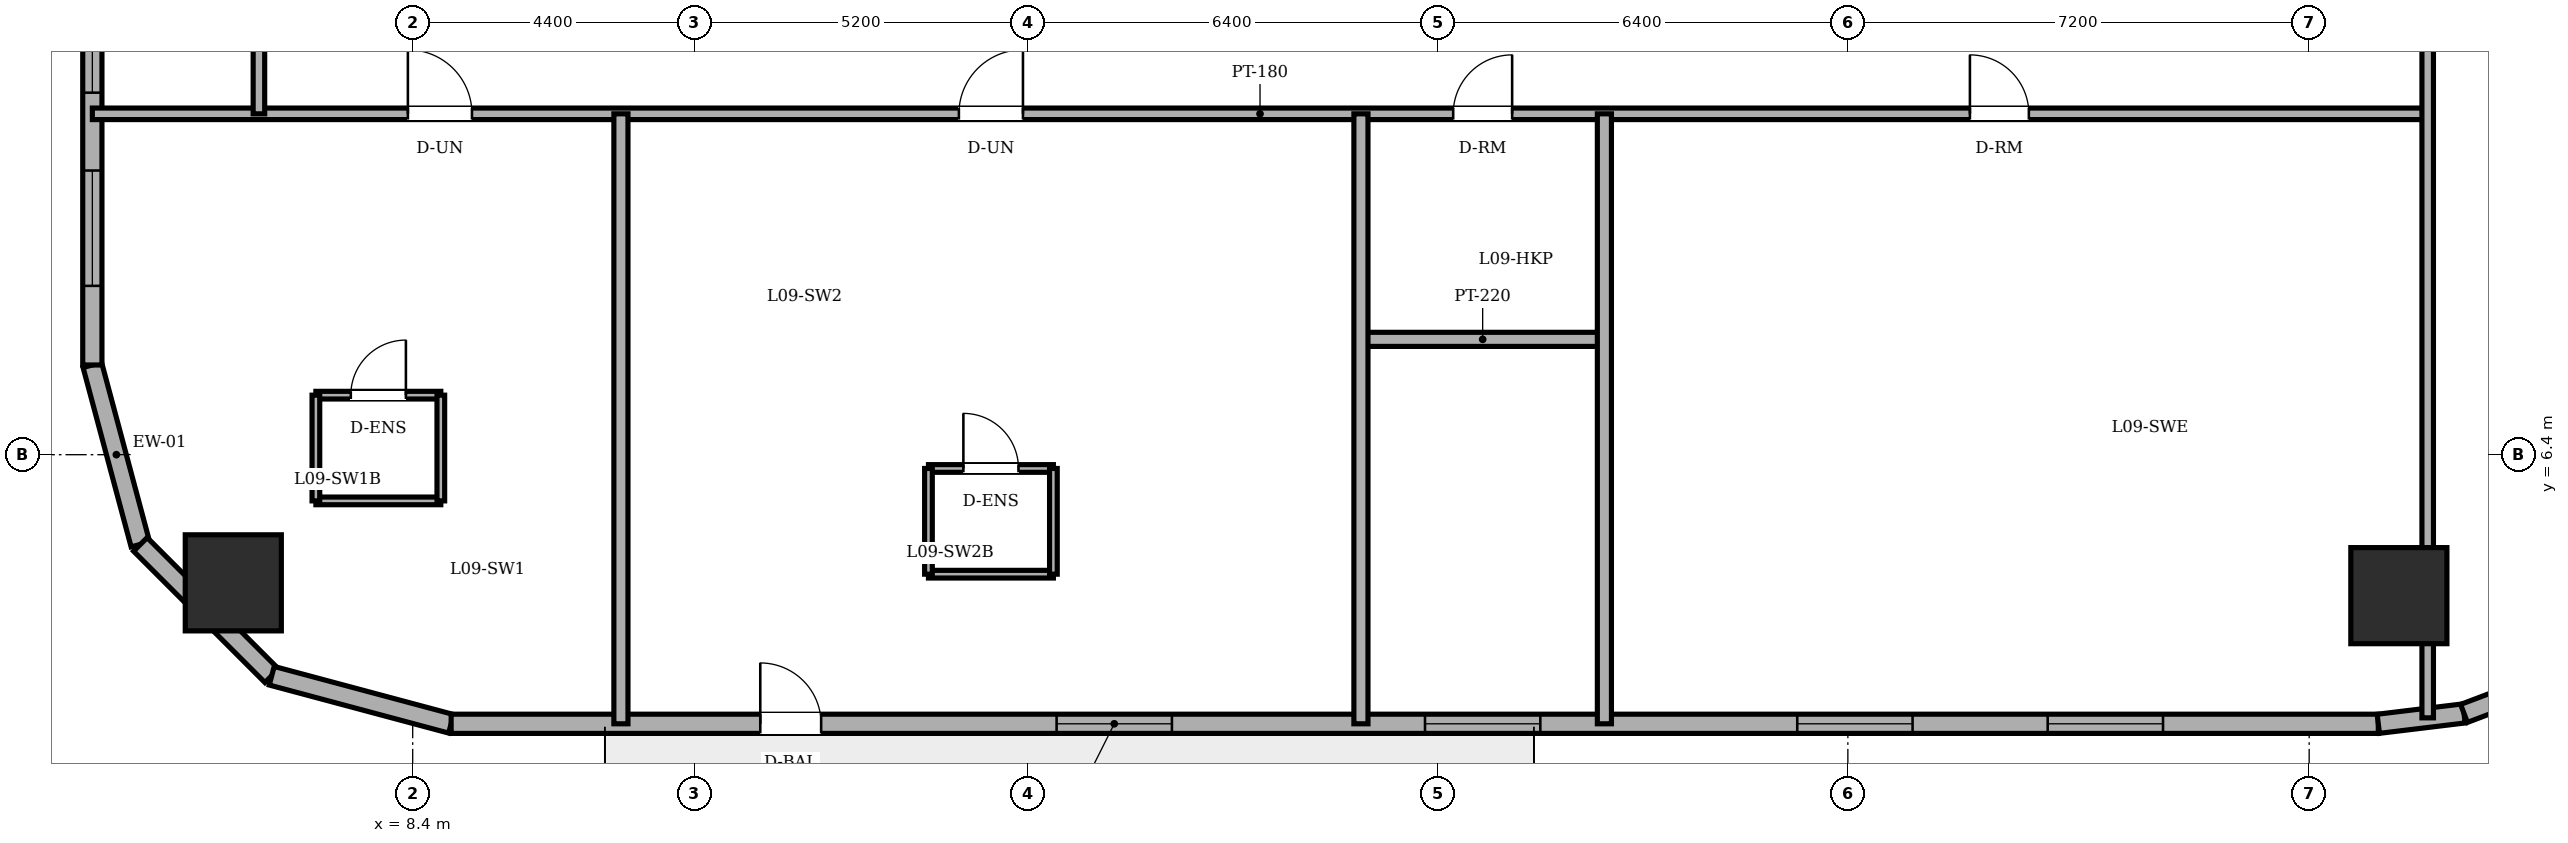
"""IFC4 building model, lengths in metres.
Left out: names, types, materials, properties, quantities, classifications, styles, units other than length and angle.
Written with IfcOpenShell. Run it as: python <this file> out.ifc"""

import sys

from ifc_helpers import new_model, si_unit, direction, frame, frame_2d, origin, origin_2d, place, context, subcontext, project, spatial, rectangle, circle, extrude, element, fill, save


model = new_model("IFC4")
c1 = context("Model", 3, precision=1e-05, world=origin(), true_north=direction((0.0, 1.0)))
c2 = subcontext(c1, "Body", "Model", "MODEL_VIEW")
j1 = project(units=[si_unit("LENGTHUNIT", "METRE"), si_unit("PLANEANGLEUNIT", "RADIAN")], contexts=[c1])
p1 = place(None, origin())
s1 = spatial("IfcSite", under=j1, at=p1, CompositionType="ELEMENT")
p2 = place(p1, origin())
s2 = spatial("IfcBuilding", under=s1, at=p2, CompositionType="ELEMENT")
p3 = place(p2, frame((0.0, 0.0, 36.0)))
s3 = spatial("IfcBuildingStorey", under=s2, at=p3, CompositionType="ELEMENT", Elevation=36.0)
for number, where, z_axis, x_axis in (
    (1, (5.6, 4.4, 0.0), (0.0, 0.0, 1.0), (1.0, 0.0, 0.0)),
    (2, (39.4, 4.2, 0.0), (0.0, 0.0, 1.0), (1.0, 0.0, 0.0)),
):
    element("IfcColumn", number, at=place(p3, frame(where, z_axis=z_axis, x_axis=x_axis)), inside=s3, PredefinedType="COLUMN", context=c2, shape_type="SweptSolid", body=[
        extrude(circle(Radius=0.75, at=origin_2d()), origin(), (0.0, 0.0, 1.0), 3.6),
    ])
p4 = place(p3, frame((3.4, 7.8, 0.0), z_axis=(0.0, 0.0, 1.0), x_axis=(0.258731875344, -0.96594917914, 0.0)))
e3 = element("IfcWall", 3, at=p4, inside=s3, PredefinedType="SOLIDWALL", context=c2, shape_type="SweptSolid", body=[
    extrude(rectangle(XDim=2.899, YDim=0.3, at=frame_2d((1.449, 0.0))), origin(), (0.0, 0.0, 1.0), 3.4),
])
p5 = place(p3, frame((4.15, 5.0, 0.0), z_axis=(0.0, 0.0, 1.0), x_axis=(0.707106781187, -0.707106781187, 0.0)))
e4 = element("IfcWall", 4, at=p5, inside=s3, PredefinedType="SOLIDWALL", context=c2, shape_type="SweptSolid", body=[
    extrude(rectangle(XDim=2.899, YDim=0.3, at=frame_2d((1.45, 0.0))), origin(), (0.0, 0.0, 1.0), 3.4),
])
p6 = place(p3, frame((6.2, 2.95, 0.0), z_axis=(0.0, 0.0, 1.0), x_axis=(0.96594917914, -0.258731875344, 0.0)))
e5 = element("IfcWall", 5, at=p6, inside=s3, PredefinedType="SOLIDWALL", context=c2, shape_type="SweptSolid", body=[
    extrude(rectangle(XDim=2.899, YDim=0.3, at=frame_2d((1.449, 0.0))), origin(), (0.0, 0.0, 1.0), 3.4),
])
p7 = place(p3, frame((9.0, 2.2, 0.0), z_axis=(0.0, 0.0, 1.0), x_axis=(1.0, 0.0, 0.0)))
e6 = element("IfcWall", 6, at=p7, inside=s3, PredefinedType="SOLIDWALL", context=c2, shape_type="SweptSolid", body=[
    extrude(rectangle(XDim=30.079, YDim=0.3, at=frame_2d((15.04, 0.0))), origin(), (0.0, 0.0, 1.0), 3.4),
])
p8 = place(p7, frame((4.825, 0.0, 0.0)))
e7 = element("IfcOpeningElement", 7, at=p8, cuts=e6, PredefinedType="OPENING", context=c2, shape_type="SweptSolid", body=[
    extrude(rectangle(XDim=0.95, YDim=2.2, at=frame_2d((0.475, 1.1))), frame((0.0, 0.16, 0.0), z_axis=(0.0, -1.0, 0.0), x_axis=(1.0, 0.0, 0.0)), (0.0, 0.0, 1.0), 0.32),
])
p9 = place(p7, frame((9.45, 0.0, 0.85)))
e8 = element("IfcOpeningElement", 8, at=p9, cuts=e6, PredefinedType="OPENING", context=c2, shape_type="SweptSolid", body=[
    extrude(rectangle(XDim=1.8, YDim=1.55, at=frame_2d((0.9, 0.775))), frame((0.0, 0.16, 0.0), z_axis=(0.0, -1.0, 0.0), x_axis=(1.0, 0.0, 0.0)), (0.0, 0.0, 1.0), 0.32),
])
p10 = place(p7, frame((15.2, 0.0, 0.85)))
e9 = element("IfcOpeningElement", 9, at=p10, cuts=e6, PredefinedType="OPENING", context=c2, shape_type="SweptSolid", body=[
    extrude(rectangle(XDim=1.8, YDim=1.55, at=frame_2d((0.9, 0.775))), frame((0.0, 0.16, 0.0), z_axis=(0.0, -1.0, 0.0), x_axis=(1.0, 0.0, 0.0)), (0.0, 0.0, 1.0), 0.32),
])
p11 = place(p7, frame((21.01, 0.0, 0.85)))
e10 = element("IfcOpeningElement", 10, at=p11, cuts=e6, PredefinedType="OPENING", context=c2, shape_type="SweptSolid", body=[
    extrude(rectangle(XDim=1.8, YDim=1.55, at=frame_2d((0.9, 0.775))), frame((0.0, 0.16, 0.0), z_axis=(0.0, -1.0, 0.0), x_axis=(1.0, 0.0, 0.0)), (0.0, 0.0, 1.0), 0.32),
])
p12 = place(p7, frame((24.919, 0.0, 0.85)))
e11 = element("IfcOpeningElement", 11, at=p12, cuts=e6, PredefinedType="OPENING", context=c2, shape_type="SweptSolid", body=[
    extrude(rectangle(XDim=1.8, YDim=1.55, at=frame_2d((0.9, 0.775))), frame((0.0, 0.16, 0.0), z_axis=(0.0, -1.0, 0.0), x_axis=(1.0, 0.0, 0.0)), (0.0, 0.0, 1.0), 0.32),
])
p13 = place(p3, frame((39.079, 2.2, 0.0), z_axis=(0.0, 0.0, 1.0), x_axis=(0.992739027259, 0.120288086515, 0.0)))
e12 = element("IfcWall", 12, at=p13, inside=s3, PredefinedType="SOLIDWALL", context=c2, shape_type="SweptSolid", body=[
    extrude(rectangle(XDim=1.348, YDim=0.3, at=frame_2d((0.674, 0.0))), origin(), (0.0, 0.0, 1.0), 3.4),
])
p14 = place(p3, frame((40.417, 2.362, 0.0), z_axis=(0.0, 0.0, 1.0), x_axis=(0.935156721165, 0.354234254216, 0.0)))
e13 = element("IfcWall", 13, at=p14, inside=s3, PredefinedType="SOLIDWALL", context=c2, shape_type="SweptSolid", body=[
    extrude(rectangle(XDim=1.349, YDim=0.3, at=frame_2d((0.675, 0.0))), origin(), (0.0, 0.0, 1.0), 3.4),
])
p15 = place(p3, frame((3.4, 40.2, 0.0), z_axis=(0.0, 0.0, 1.0), x_axis=(0.0, -1.0, 0.0)))
e14 = element("IfcWall", 14, at=p15, inside=s3, PredefinedType="SOLIDWALL", context=c2, shape_type="SweptSolid", body=[
    extrude(rectangle(XDim=32.4, YDim=0.3, at=frame_2d((16.2, 0.0))), origin(), (0.0, 0.0, 1.0), 3.4),
])
p16 = place(p15, frame((1.235, 0.0, 0.85)))
e15 = element("IfcOpeningElement", 15, at=p16, cuts=e14, PredefinedType="OPENING", context=c2, shape_type="SweptSolid", body=[
    extrude(rectangle(XDim=1.8, YDim=1.55, at=frame_2d((0.9, 0.775))), frame((0.0, 0.16, 0.0), z_axis=(0.0, -1.0, 0.0), x_axis=(1.0, 0.0, 0.0)), (0.0, 0.0, 1.0), 0.32),
])
p17 = place(p15, frame((4.25, 0.0, 0.85)))
e16 = element("IfcOpeningElement", 16, at=p17, cuts=e14, PredefinedType="OPENING", context=c2, shape_type="SweptSolid", body=[
    extrude(rectangle(XDim=1.8, YDim=1.55, at=frame_2d((0.9, 0.775))), frame((0.0, 0.16, 0.0), z_axis=(0.0, -1.0, 0.0), x_axis=(1.0, 0.0, 0.0)), (0.0, 0.0, 1.0), 0.32),
])
p18 = place(p15, frame((9.253, 0.0, 0.85)))
e17 = element("IfcOpeningElement", 17, at=p18, cuts=e14, PredefinedType="OPENING", context=c2, shape_type="SweptSolid", body=[
    extrude(rectangle(XDim=1.8, YDim=1.55, at=frame_2d((0.9, 0.775))), frame((0.0, 0.16, 0.0), z_axis=(0.0, -1.0, 0.0), x_axis=(1.0, 0.0, 0.0)), (0.0, 0.0, 1.0), 0.32),
])
p19 = place(p15, frame((13.027, 0.0, 0.85)))
e18 = element("IfcOpeningElement", 18, at=p19, cuts=e14, PredefinedType="OPENING", context=c2, shape_type="SweptSolid", body=[
    extrude(rectangle(XDim=1.8, YDim=1.55, at=frame_2d((0.9, 0.775))), frame((0.0, 0.16, 0.0), z_axis=(0.0, -1.0, 0.0), x_axis=(1.0, 0.0, 0.0)), (0.0, 0.0, 1.0), 0.32),
])
p20 = place(p15, frame((19.573, 0.0, 0.85)))
e19 = element("IfcOpeningElement", 19, at=p20, cuts=e14, PredefinedType="OPENING", context=c2, shape_type="SweptSolid", body=[
    extrude(rectangle(XDim=1.8, YDim=1.55, at=frame_2d((0.9, 0.775))), frame((0.0, 0.16, 0.0), z_axis=(0.0, -1.0, 0.0), x_axis=(1.0, 0.0, 0.0)), (0.0, 0.0, 1.0), 0.32),
])
p21 = place(p15, frame((22.347, 0.0, 0.85)))
e20 = element("IfcOpeningElement", 20, at=p21, cuts=e14, PredefinedType="OPENING", context=c2, shape_type="SweptSolid", body=[
    extrude(rectangle(XDim=1.8, YDim=1.55, at=frame_2d((0.9, 0.775))), frame((0.0, 0.16, 0.0), z_axis=(0.0, -1.0, 0.0), x_axis=(1.0, 0.0, 0.0)), (0.0, 0.0, 1.0), 0.32),
])
p22 = place(p15, frame((26.35, 0.0, 0.85)))
e21 = element("IfcOpeningElement", 21, at=p22, cuts=e14, PredefinedType="OPENING", context=c2, shape_type="SweptSolid", body=[
    extrude(rectangle(XDim=1.8, YDim=1.55, at=frame_2d((0.9, 0.775))), frame((0.0, 0.16, 0.0), z_axis=(0.0, -1.0, 0.0), x_axis=(1.0, 0.0, 0.0)), (0.0, 0.0, 1.0), 0.32),
])
p23 = place(p15, frame((29.365, 0.0, 0.85)))
e22 = element("IfcOpeningElement", 22, at=p23, cuts=e14, PredefinedType="OPENING", context=c2, shape_type="SweptSolid", body=[
    extrude(rectangle(XDim=1.8, YDim=1.55, at=frame_2d((0.9, 0.775))), frame((0.0, 0.16, 0.0), z_axis=(0.0, -1.0, 0.0), x_axis=(1.0, 0.0, 0.0)), (0.0, 0.0, 1.0), 0.32),
])
p24 = place(p3, frame((6.889, 7.329, 0.0), z_axis=(0.0, 0.0, 1.0), x_axis=(1.0, 0.0, 0.0)))
e23 = element("IfcWall", 23, at=p24, inside=s3, PredefinedType="PARTITIONING", context=c2, shape_type="SweptSolid", body=[
    extrude(rectangle(XDim=1.95, YDim=0.12, at=frame_2d((0.975, 0.0))), origin(), (0.0, 0.0, 1.0), 3.4),
])
p25 = place(p24, frame((0.545, 0.0, 0.0)))
e24 = element("IfcOpeningElement", 24, at=p25, cuts=e23, PredefinedType="OPENING", context=c2, shape_type="SweptSolid", body=[
    extrude(rectangle(XDim=0.86, YDim=2.1, at=frame_2d((0.43, 1.05))), frame((0.0, 0.07, 0.0), z_axis=(0.0, -1.0, 0.0), x_axis=(1.0, 0.0, 0.0)), (0.0, 0.0, 1.0), 0.14),
])
p26 = place(p3, frame((8.839, 5.679, 0.0), z_axis=(0.0, 0.0, 1.0), x_axis=(-1.0, 0.0, 0.0)))
e25 = element("IfcWall", 25, at=p26, inside=s3, PredefinedType="PARTITIONING", context=c2, shape_type="SweptSolid", body=[
    extrude(rectangle(XDim=1.95, YDim=0.12, at=frame_2d((0.975, 0.0))), origin(), (0.0, 0.0, 1.0), 3.4),
])
for number, where, z_axis, x_axis in (
    (26, (6.889, 7.329, 0.0), (0.0, 0.0, 1.0), (0.0, -1.0, 0.0)),
    (27, (8.839, 5.679, 0.0), (0.0, 0.0, 1.0), (0.0, 1.0, 0.0)),
):
    element("IfcWall", number, at=place(p3, frame(where, z_axis=z_axis, x_axis=x_axis)), inside=s3, PredefinedType="PARTITIONING", context=c2, shape_type="SweptSolid", body=[
        extrude(rectangle(XDim=1.65, YDim=0.12, at=frame_2d((0.825, 0.0))), origin(), (0.0, 0.0, 1.0), 3.4),
    ])
p27 = place(p3, frame((16.45, 6.185, 0.0), z_axis=(0.0, 0.0, 1.0), x_axis=(1.0, 0.0, 0.0)))
e28 = element("IfcWall", 28, at=p27, inside=s3, PredefinedType="PARTITIONING", context=c2, shape_type="SweptSolid", body=[
    extrude(rectangle(XDim=1.95, YDim=0.12, at=frame_2d((0.975, 0.0))), origin(), (0.0, 0.0, 1.0), 3.4),
])
p28 = place(p27, frame((0.545, 0.0, 0.0)))
e29 = element("IfcOpeningElement", 29, at=p28, cuts=e28, PredefinedType="OPENING", context=c2, shape_type="SweptSolid", body=[
    extrude(rectangle(XDim=0.86, YDim=2.1, at=frame_2d((0.43, 1.05))), frame((0.0, 0.07, 0.0), z_axis=(0.0, -1.0, 0.0), x_axis=(1.0, 0.0, 0.0)), (0.0, 0.0, 1.0), 0.14),
])
p29 = place(p3, frame((18.4, 4.535, 0.0), z_axis=(0.0, 0.0, 1.0), x_axis=(-1.0, 0.0, 0.0)))
e30 = element("IfcWall", 30, at=p29, inside=s3, PredefinedType="PARTITIONING", context=c2, shape_type="SweptSolid", body=[
    extrude(rectangle(XDim=1.95, YDim=0.12, at=frame_2d((0.975, 0.0))), origin(), (0.0, 0.0, 1.0), 2.882),
])
for number, where, z_axis, x_axis in (
    (31, (16.45, 6.185, 0.0), (0.0, 0.0, 1.0), (0.0, -1.0, 0.0)),
    (32, (18.4, 4.535, 0.0), (0.0, 0.0, 1.0), (0.0, 1.0, 0.0)),
):
    element("IfcWall", number, at=place(p3, frame(where, z_axis=z_axis, x_axis=x_axis)), inside=s3, PredefinedType="PARTITIONING", context=c2, shape_type="SweptSolid", body=[
        extrude(rectangle(XDim=1.65, YDim=0.12, at=frame_2d((0.825, 0.0))), origin(), (0.0, 0.0, 1.0), 3.4),
    ])
p30 = place(p3, frame((23.2, 8.2, 0.0), z_axis=(0.0, 0.0, 1.0), x_axis=(1.0, 0.0, 0.0)))
e33 = element("IfcWall", 33, at=p30, inside=s3, PredefinedType="PARTITIONING", context=c2, shape_type="SweptSolid", body=[
    extrude(rectangle(XDim=3.8, YDim=0.22, at=frame_2d((1.9, 0.0))), origin(), (0.0, 0.0, 1.0), 3.4),
])
p31 = place(p3, frame((3.4, 11.72, 0.0), z_axis=(0.0, 0.0, 1.0), x_axis=(1.0, 0.0, 0.0)))
e34 = element("IfcWall", 34, at=p31, inside=s3, PredefinedType="PARTITIONING", context=c2, shape_type="SweptSolid", body=[
    extrude(rectangle(XDim=36.45, YDim=0.18, at=frame_2d((18.225, 0.0))), origin(), (0.0, 0.0, 1.0), 3.4),
])
p32 = place(p31, frame((21.24, 0.0, 0.0)))
e35 = element("IfcOpeningElement", 35, at=p32, cuts=e34, PredefinedType="OPENING", context=c2, shape_type="SweptSolid", body=[
    extrude(rectangle(XDim=0.92, YDim=2.1, at=frame_2d((0.46, 1.05))), frame((0.0, 0.1, 0.0), z_axis=(0.0, -1.0, 0.0), x_axis=(1.0, 0.0, 0.0)), (0.0, 0.0, 1.0), 0.2),
])
p33 = place(p31, frame((4.925, 0.0, 0.0)))
e36 = element("IfcOpeningElement", 36, at=p33, cuts=e34, PredefinedType="OPENING", context=c2, shape_type="SweptSolid", body=[
    extrude(rectangle(XDim=1.0, YDim=2.15, at=frame_2d((0.5, 1.075))), frame((0.0, 0.1, 0.0), z_axis=(0.0, -1.0, 0.0), x_axis=(1.0, 0.0, 0.0)), (0.0, 0.0, 1.0), 0.2),
])
p34 = place(p31, frame((13.525, 0.0, 0.0)))
e37 = element("IfcOpeningElement", 37, at=p34, cuts=e34, PredefinedType="OPENING", context=c2, shape_type="SweptSolid", body=[
    extrude(rectangle(XDim=1.0, YDim=2.15, at=frame_2d((0.5, 1.075))), frame((0.0, 0.1, 0.0), z_axis=(0.0, -1.0, 0.0), x_axis=(1.0, 0.0, 0.0)), (0.0, 0.0, 1.0), 0.2),
])
p35 = place(p31, frame((29.305, 0.0, 0.0)))
e38 = element("IfcOpeningElement", 38, at=p35, cuts=e34, PredefinedType="OPENING", context=c2, shape_type="SweptSolid", body=[
    extrude(rectangle(XDim=0.92, YDim=2.1, at=frame_2d((0.46, 1.05))), frame((0.0, 0.1, 0.0), z_axis=(0.0, -1.0, 0.0), x_axis=(1.0, 0.0, 0.0)), (0.0, 0.0, 1.0), 0.2),
])
p36 = place(p3, frame((6.0, 11.72, 0.0), z_axis=(0.0, 0.0, 1.0), x_axis=(0.0, 1.0, 0.0)))
e39 = element("IfcWall", 39, at=p36, inside=s3, PredefinedType="PARTITIONING", context=c2, shape_type="SweptSolid", body=[
    extrude(rectangle(XDim=2.46, YDim=0.18, at=frame_2d((1.23, 0.0))), origin(), (0.0, 0.0, 1.0), 3.4),
])
for number, where, z_axis, x_axis in (
    (40, (11.65, 2.2, 0.0), (0.0, 0.0, 1.0), (0.0, 1.0, 0.0)),
    (41, (23.2, 2.2, 0.0), (0.0, 0.0, 1.0), (0.0, 1.0, 0.0)),
    (42, (27.0, 2.2, 0.0), (0.0, 0.0, 1.0), (0.0, 1.0, 0.0)),
):
    element("IfcWall", number, at=place(p3, frame(where, z_axis=z_axis, x_axis=x_axis)), inside=s3, PredefinedType="PARTITIONING", context=c2, shape_type="SweptSolid", body=[
        extrude(rectangle(XDim=9.52, YDim=0.22, at=frame_2d((4.76, 0.0))), origin(), (0.0, 0.0, 1.0), 3.4),
    ])
p37 = place(p3, frame((39.85, 2.293, 0.0), z_axis=(0.0, 0.0, 1.0), x_axis=(0.0, 1.0, 0.0)))
e43 = element("IfcWall", 43, at=p37, inside=s3, PredefinedType="PARTITIONING", context=c2, shape_type="SweptSolid", body=[
    extrude(rectangle(XDim=20.527, YDim=0.18, at=frame_2d((10.264, 0.0))), origin(), (0.0, 0.0, 1.0), 2.782),
])
p38 = place(p37, frame((14.257, 0.0, 0.0)))
e44 = element("IfcOpeningElement", 44, at=p38, cuts=e43, PredefinedType="OPENING", context=c2, shape_type="SweptSolid", body=[
    extrude(rectangle(XDim=0.92, YDim=2.1, at=frame_2d((0.46, 1.05))), frame((0.0, 0.1, 0.0), z_axis=(0.0, -1.0, 0.0), x_axis=(1.0, 0.0, 0.0)), (0.0, 0.0, 1.0), 0.2),
])
p39 = place(p8, origin())
e45 = element("IfcDoor", 45, at=p39, inside=s3, OperationType="SINGLE_SWING_LEFT", PredefinedType="DOOR", context=c2, shape_type="SweptSolid", body=[
    extrude(rectangle(XDim=0.95, YDim=2.2, at=frame_2d((0.475, 1.1))), frame((0.0, 0.025, 0.0), z_axis=(0.0, -1.0, 0.0), x_axis=(1.0, 0.0, 0.0)), (0.0, 0.0, 1.0), 0.05),
])
fill(e7, e45)
p40 = place(p9, origin())
e46 = element("IfcWindow", 46, at=p40, inside=s3, PartitioningType="DOUBLE_PANEL_VERTICAL", PredefinedType="WINDOW", context=c2, shape_type="SweptSolid", body=[
    extrude(rectangle(XDim=1.8, YDim=1.55, at=frame_2d((0.9, 0.775))), frame((0.0, 0.03, 0.0), z_axis=(0.0, -1.0, 0.0), x_axis=(1.0, 0.0, 0.0)), (0.0, 0.0, 1.0), 0.06),
])
fill(e8, e46)
p41 = place(p10, origin())
e47 = element("IfcWindow", 47, at=p41, inside=s3, PartitioningType="DOUBLE_PANEL_VERTICAL", PredefinedType="WINDOW", context=c2, shape_type="SweptSolid", body=[
    extrude(rectangle(XDim=1.8, YDim=1.55, at=frame_2d((0.9, 0.775))), frame((0.0, 0.03, 0.0), z_axis=(0.0, -1.0, 0.0), x_axis=(1.0, 0.0, 0.0)), (0.0, 0.0, 1.0), 0.06),
])
fill(e9, e47)
p42 = place(p11, origin())
e48 = element("IfcWindow", 48, at=p42, inside=s3, PartitioningType="DOUBLE_PANEL_VERTICAL", PredefinedType="WINDOW", context=c2, shape_type="SweptSolid", body=[
    extrude(rectangle(XDim=1.8, YDim=1.55, at=frame_2d((0.9, 0.775))), frame((0.0, 0.03, 0.0), z_axis=(0.0, -1.0, 0.0), x_axis=(1.0, 0.0, 0.0)), (0.0, 0.0, 1.0), 0.06),
])
fill(e10, e48)
p43 = place(p12, origin())
e49 = element("IfcWindow", 49, at=p43, inside=s3, PartitioningType="DOUBLE_PANEL_VERTICAL", PredefinedType="WINDOW", context=c2, shape_type="SweptSolid", body=[
    extrude(rectangle(XDim=1.8, YDim=1.55, at=frame_2d((0.9, 0.775))), frame((0.0, 0.03, 0.0), z_axis=(0.0, -1.0, 0.0), x_axis=(1.0, 0.0, 0.0)), (0.0, 0.0, 1.0), 0.06),
])
fill(e11, e49)
p44 = place(p22, origin())
e50 = element("IfcWindow", 50, at=p44, inside=s3, PartitioningType="DOUBLE_PANEL_VERTICAL", PredefinedType="WINDOW", context=c2, shape_type="SweptSolid", body=[
    extrude(rectangle(XDim=1.8, YDim=1.55, at=frame_2d((0.9, 0.775))), frame((0.0, 0.03, 0.0), z_axis=(0.0, -1.0, 0.0), x_axis=(1.0, 0.0, 0.0)), (0.0, 0.0, 1.0), 0.06),
])
fill(e21, e50)
p45 = place(p23, origin())
e51 = element("IfcWindow", 51, at=p45, inside=s3, PartitioningType="DOUBLE_PANEL_VERTICAL", PredefinedType="WINDOW", context=c2, shape_type="SweptSolid", body=[
    extrude(rectangle(XDim=1.8, YDim=1.55, at=frame_2d((0.9, 0.775))), frame((0.0, 0.03, 0.0), z_axis=(0.0, -1.0, 0.0), x_axis=(1.0, 0.0, 0.0)), (0.0, 0.0, 1.0), 0.06),
])
fill(e22, e51)
p46 = place(p25, origin())
e52 = element("IfcDoor", 52, at=p46, inside=s3, OperationType="SINGLE_SWING_RIGHT", PredefinedType="DOOR", context=c2, shape_type="SweptSolid", body=[
    extrude(rectangle(XDim=0.86, YDim=2.1, at=frame_2d((0.43, 1.05))), frame((0.0, 0.025, 0.0), z_axis=(0.0, -1.0, 0.0), x_axis=(1.0, 0.0, 0.0)), (0.0, 0.0, 1.0), 0.05),
])
fill(e24, e52)
p47 = place(p28, origin())
e53 = element("IfcDoor", 53, at=p47, inside=s3, OperationType="SINGLE_SWING_LEFT", PredefinedType="DOOR", context=c2, shape_type="SweptSolid", body=[
    extrude(rectangle(XDim=0.86, YDim=2.1, at=frame_2d((0.43, 1.05))), frame((0.0, 0.025, 0.0), z_axis=(0.0, -1.0, 0.0), x_axis=(1.0, 0.0, 0.0)), (0.0, 0.0, 1.0), 0.05),
])
fill(e29, e53)
p48 = place(p32, origin())
e54 = element("IfcDoor", 54, at=p48, inside=s3, OperationType="SINGLE_SWING_RIGHT", PredefinedType="DOOR", context=c2, shape_type="SweptSolid", body=[
    extrude(rectangle(XDim=0.92, YDim=2.1, at=frame_2d((0.46, 1.05))), frame((0.0, 0.025, 0.0), z_axis=(0.0, -1.0, 0.0), x_axis=(1.0, 0.0, 0.0)), (0.0, 0.0, 1.0), 0.05),
])
fill(e35, e54)
p49 = place(p33, origin())
e55 = element("IfcDoor", 55, at=p49, inside=s3, OperationType="SINGLE_SWING_LEFT", PredefinedType="DOOR", context=c2, shape_type="SweptSolid", body=[
    extrude(rectangle(XDim=1.0, YDim=2.15, at=frame_2d((0.5, 1.075))), frame((0.0, 0.025, 0.0), z_axis=(0.0, -1.0, 0.0), x_axis=(1.0, 0.0, 0.0)), (0.0, 0.0, 1.0), 0.05),
])
fill(e36, e55)
p50 = place(p34, origin())
e56 = element("IfcDoor", 56, at=p50, inside=s3, OperationType="SINGLE_SWING_RIGHT", PredefinedType="DOOR", context=c2, shape_type="SweptSolid", body=[
    extrude(rectangle(XDim=1.0, YDim=2.15, at=frame_2d((0.5, 1.075))), frame((0.0, 0.025, 0.0), z_axis=(0.0, -1.0, 0.0), x_axis=(1.0, 0.0, 0.0)), (0.0, 0.0, 1.0), 0.05),
])
fill(e37, e56)
p51 = place(p35, origin())
e57 = element("IfcDoor", 57, at=p51, inside=s3, OperationType="SINGLE_SWING_LEFT", PredefinedType="DOOR", context=c2, shape_type="SweptSolid", body=[
    extrude(rectangle(XDim=0.92, YDim=2.1, at=frame_2d((0.46, 1.05))), frame((0.0, 0.025, 0.0), z_axis=(0.0, -1.0, 0.0), x_axis=(1.0, 0.0, 0.0)), (0.0, 0.0, 1.0), 0.05),
])
fill(e38, e57)
save(model, sys.argv[1])
